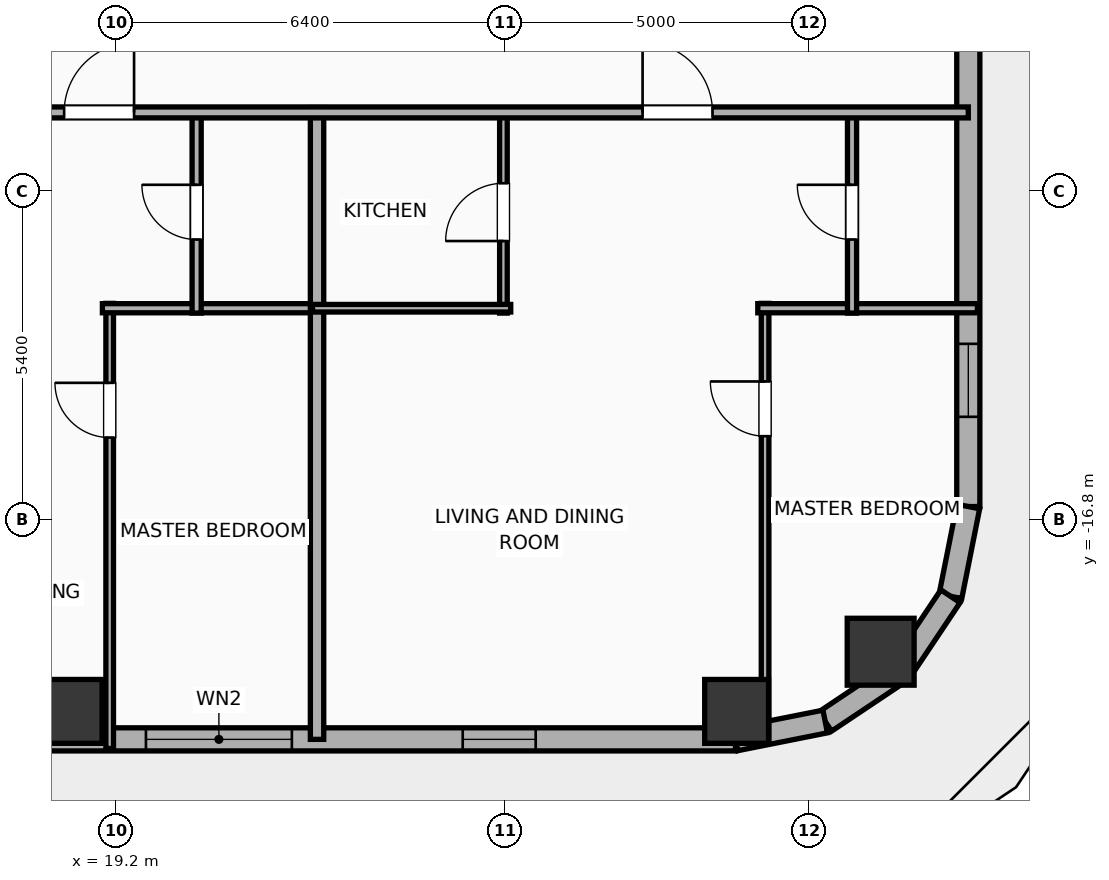
"""IFC4 building model, lengths in metres.
Left out: names, types, materials, properties, quantities, classifications, styles, units other than length and angle.
Written with IfcOpenShell. Run it as: python <this file> out.ifc"""

import sys

from ifc_helpers import new_model, si_unit, direction, frame, frame_2d, origin, origin_2d, place, context, subcontext, project, spatial, rectangle, hollow_rectangle, hollow_circle, extrude, element, fill, save


model = new_model("IFC4")
c1 = context("Model", 3, precision=1e-05, world=origin(), true_north=direction((0.0, 1.0)))
c2 = subcontext(c1, "Body", "Model", "MODEL_VIEW")
j1 = project(units=[si_unit("LENGTHUNIT", "METRE"), si_unit("PLANEANGLEUNIT", "RADIAN")], contexts=[c1])
p1 = place(None, origin())
s1 = spatial("IfcSite", under=j1, at=p1, CompositionType="ELEMENT")
p2 = place(p1, origin())
s2 = spatial("IfcBuilding", under=s1, at=p2, CompositionType="ELEMENT")
p3 = place(p2, frame((0.0, 0.0, 113.1)))
s3 = spatial("IfcBuildingStorey", under=s2, at=p3, CompositionType="ELEMENT", Elevation=113.1)
for number, where, z_axis, x_axis in (
    (1, (18.44, -19.95, 0.0), (0.0, 0.0, 1.0), (1.0, 0.0, 0.0)),
    (2, (29.4, -19.95, 0.0), (0.0, 0.0, 1.0), (1.0, 0.0, 0.0)),
):
    element("IfcColumn", number, at=place(p3, frame(where, z_axis=z_axis, x_axis=x_axis)), inside=s3, PredefinedType="COLUMN", context=c2, shape_type="SweptSolid", body=[
        extrude(hollow_rectangle(XDim=1.05, YDim=1.05, WallThickness=0.036, at=origin_2d()), origin(), (0.0, 0.0, 1.0), 3.9),
    ])
p4 = place(p3, frame((31.769, -18.969, 0.0), z_axis=(0.0, 0.0, 1.0), x_axis=(1.0, 0.0, 0.0)))
e3 = element("IfcColumn", 3, at=p4, inside=s3, PredefinedType="COLUMN", context=c2, shape_type="SweptSolid", body=[
    extrude(hollow_circle(Radius=0.55, WallThickness=0.036, at=origin_2d()), origin(), (0.0, 0.0, 1.0), 3.9),
])
p5 = place(p3, frame((29.381, -20.41, 0.0), z_axis=(0.0, 0.0, 1.0), x_axis=(-1.0, 0.0, 0.0)))
e4 = element("IfcWall", 4, at=p5, inside=s3, PredefinedType="ELEMENTEDWALL", context=c2, shape_type="SweptSolid", body=[
    extrude(rectangle(XDim=54.763, YDim=0.38, at=frame_2d((27.381, 0.0))), origin(), (0.0, 0.0, 1.0), 3.65),
])
p6 = place(p5, frame((15.679, 0.0, 0.0)))
e5 = element("IfcOpeningElement", 5, at=p6, cuts=e4, PredefinedType="OPENING", context=c2, shape_type="SweptSolid", body=[
    extrude(rectangle(XDim=1.5, YDim=2.05, at=frame_2d((0.75, 1.025))), frame((0.0, 0.2, 0.0), z_axis=(0.0, -1.0, 0.0), x_axis=(1.0, 0.0, 0.0)), (0.0, 0.0, 1.0), 0.4),
])
p7 = place(p5, frame((7.295, 0.0, 0.75)))
e6 = element("IfcOpeningElement", 6, at=p7, cuts=e4, PredefinedType="OPENING", context=c2, shape_type="SweptSolid", body=[
    extrude(rectangle(XDim=2.4, YDim=2.1, at=frame_2d((1.2, 1.05))), frame((0.0, 0.2, 0.0), z_axis=(0.0, -1.0, 0.0), x_axis=(1.0, 0.0, 0.0)), (0.0, 0.0, 1.0), 0.4),
])
p8 = place(p5, frame((18.486, 0.0, 0.75)))
e7 = element("IfcOpeningElement", 7, at=p8, cuts=e4, PredefinedType="OPENING", context=c2, shape_type="SweptSolid", body=[
    extrude(rectangle(XDim=2.4, YDim=2.1, at=frame_2d((1.2, 1.05))), frame((0.0, 0.2, 0.0), z_axis=(0.0, -1.0, 0.0), x_axis=(1.0, 0.0, 0.0)), (0.0, 0.0, 1.0), 0.4),
])
p9 = place(p5, frame((33.877, 0.0, 0.75)))
e8 = element("IfcOpeningElement", 8, at=p9, cuts=e4, PredefinedType="OPENING", context=c2, shape_type="SweptSolid", body=[
    extrude(rectangle(XDim=2.4, YDim=2.1, at=frame_2d((1.2, 1.05))), frame((0.0, 0.2, 0.0), z_axis=(0.0, -1.0, 0.0), x_axis=(1.0, 0.0, 0.0)), (0.0, 0.0, 1.0), 0.4),
])
p10 = place(p5, frame((48.367, 0.0, 0.75)))
e9 = element("IfcOpeningElement", 9, at=p10, cuts=e4, PredefinedType="OPENING", context=c2, shape_type="SweptSolid", body=[
    extrude(rectangle(XDim=2.4, YDim=2.1, at=frame_2d((1.2, 1.05))), frame((0.0, 0.2, 0.0), z_axis=(0.0, -1.0, 0.0), x_axis=(1.0, 0.0, 0.0)), (0.0, 0.0, 1.0), 0.4),
])
p11 = place(p5, frame((37.584, 0.0, 0.0)))
e10 = element("IfcOpeningElement", 10, at=p11, cuts=e4, PredefinedType="OPENING", context=c2, shape_type="SweptSolid", body=[
    extrude(rectangle(XDim=1.5, YDim=2.05, at=frame_2d((0.75, 1.025))), frame((0.0, 0.2, 0.0), z_axis=(0.0, -1.0, 0.0), x_axis=(1.0, 0.0, 0.0)), (0.0, 0.0, 1.0), 0.4),
])
p12 = place(p5, frame((52.277, 0.0, 0.75)))
e11 = element("IfcOpeningElement", 11, at=p12, cuts=e4, PredefinedType="OPENING", context=c2, shape_type="SweptSolid", body=[
    extrude(rectangle(XDim=1.2, YDim=2.05, at=frame_2d((0.6, 1.025))), frame((0.0, 0.2, 0.0), z_axis=(0.0, -1.0, 0.0), x_axis=(1.0, 0.0, 0.0)), (0.0, 0.0, 1.0), 0.4),
])
p13 = place(p5, frame((45.486, 0.0, 0.75)))
e12 = element("IfcOpeningElement", 12, at=p13, cuts=e4, PredefinedType="OPENING", context=c2, shape_type="SweptSolid", body=[
    extrude(rectangle(XDim=1.2, YDim=2.05, at=frame_2d((0.6, 1.025))), frame((0.0, 0.2, 0.0), z_axis=(0.0, -1.0, 0.0), x_axis=(1.0, 0.0, 0.0)), (0.0, 0.0, 1.0), 0.4),
])
p14 = place(p5, frame((41.736, 0.0, 0.75)))
e13 = element("IfcOpeningElement", 13, at=p14, cuts=e4, PredefinedType="OPENING", context=c2, shape_type="SweptSolid", body=[
    extrude(rectangle(XDim=1.2, YDim=2.05, at=frame_2d((0.6, 1.025))), frame((0.0, 0.2, 0.0), z_axis=(0.0, -1.0, 0.0), x_axis=(1.0, 0.0, 0.0)), (0.0, 0.0, 1.0), 0.4),
])
p15 = place(p5, frame((30.486, 0.0, 0.75)))
e14 = element("IfcOpeningElement", 14, at=p15, cuts=e4, PredefinedType="OPENING", context=c2, shape_type="SweptSolid", body=[
    extrude(rectangle(XDim=1.2, YDim=2.05, at=frame_2d((0.6, 1.025))), frame((0.0, 0.2, 0.0), z_axis=(0.0, -1.0, 0.0), x_axis=(1.0, 0.0, 0.0)), (0.0, 0.0, 1.0), 0.4),
])
p16 = place(p5, frame((26.736, 0.0, 0.75)))
e15 = element("IfcOpeningElement", 15, at=p16, cuts=e4, PredefinedType="OPENING", context=c2, shape_type="SweptSolid", body=[
    extrude(rectangle(XDim=1.2, YDim=2.05, at=frame_2d((0.6, 1.025))), frame((0.0, 0.2, 0.0), z_axis=(0.0, -1.0, 0.0), x_axis=(1.0, 0.0, 0.0)), (0.0, 0.0, 1.0), 0.4),
])
p17 = place(p5, frame((22.986, 0.0, 0.75)))
e16 = element("IfcOpeningElement", 16, at=p17, cuts=e4, PredefinedType="OPENING", context=c2, shape_type="SweptSolid", body=[
    extrude(rectangle(XDim=1.2, YDim=2.05, at=frame_2d((0.6, 1.025))), frame((0.0, 0.2, 0.0), z_axis=(0.0, -1.0, 0.0), x_axis=(1.0, 0.0, 0.0)), (0.0, 0.0, 1.0), 0.4),
])
p18 = place(p5, frame((11.736, 0.0, 0.75)))
e17 = element("IfcOpeningElement", 17, at=p18, cuts=e4, PredefinedType="OPENING", context=c2, shape_type="SweptSolid", body=[
    extrude(rectangle(XDim=1.2, YDim=2.05, at=frame_2d((0.6, 1.025))), frame((0.0, 0.2, 0.0), z_axis=(0.0, -1.0, 0.0), x_axis=(1.0, 0.0, 0.0)), (0.0, 0.0, 1.0), 0.4),
])
p19 = place(p5, frame((3.286, 0.0, 0.75)))
e18 = element("IfcOpeningElement", 18, at=p19, cuts=e4, PredefinedType="OPENING", context=c2, shape_type="SweptSolid", body=[
    extrude(rectangle(XDim=1.2, YDim=2.05, at=frame_2d((0.6, 1.025))), frame((0.0, 0.2, 0.0), z_axis=(0.0, -1.0, 0.0), x_axis=(1.0, 0.0, 0.0)), (0.0, 0.0, 1.0), 0.4),
])
p20 = place(p3, frame((33.21, 17.781, 0.0), z_axis=(0.0, 0.0, 1.0), x_axis=(0.0, -1.0, 0.0)))
e19 = element("IfcWall", 19, at=p20, inside=s3, PredefinedType="ELEMENTEDWALL", context=c2, shape_type="SweptSolid", body=[
    extrude(rectangle(XDim=34.363, YDim=0.38, at=frame_2d((17.181, 0.0))), origin(), (0.0, 0.0, 1.0), 3.65),
])
p21 = place(p20, frame((31.687, 0.0, 0.75)))
e20 = element("IfcOpeningElement", 20, at=p21, cuts=e19, PredefinedType="OPENING", context=c2, shape_type="SweptSolid", body=[
    extrude(rectangle(XDim=1.2, YDim=2.05, at=frame_2d((0.6, 1.025))), frame((0.0, 0.2, 0.0), z_axis=(0.0, -1.0, 0.0), x_axis=(1.0, 0.0, 0.0)), (0.0, 0.0, 1.0), 0.4),
])
p22 = place(p20, frame((12.836, 0.0, 0.75)))
e21 = element("IfcOpeningElement", 21, at=p22, cuts=e19, PredefinedType="OPENING", context=c2, shape_type="SweptSolid", body=[
    extrude(rectangle(XDim=1.2, YDim=2.05, at=frame_2d((0.6, 1.025))), frame((0.0, 0.2, 0.0), z_axis=(0.0, -1.0, 0.0), x_axis=(1.0, 0.0, 0.0)), (0.0, 0.0, 1.0), 0.4),
])
p23 = place(p20, frame((21.386, 0.0, 0.75)))
e22 = element("IfcOpeningElement", 22, at=p23, cuts=e19, PredefinedType="OPENING", context=c2, shape_type="SweptSolid", body=[
    extrude(rectangle(XDim=1.2, YDim=2.05, at=frame_2d((0.6, 1.025))), frame((0.0, 0.2, 0.0), z_axis=(0.0, -1.0, 0.0), x_axis=(1.0, 0.0, 0.0)), (0.0, 0.0, 1.0), 0.4),
])
p24 = place(p3, frame((33.21, -16.581, 0.0), z_axis=(0.0, 0.0, 1.0), x_axis=(-0.195086038585, -0.980786132421, 0.0)))
e23 = element("IfcWall", 23, at=p24, inside=s3, PredefinedType="ELEMENTEDWALL", context=c2, shape_type="SweptSolid", body=[
    extrude(rectangle(XDim=1.504, YDim=0.38, at=frame_2d((0.752, 0.0))), origin(), (0.0, 0.0, 1.0), 3.65),
])
p25 = place(p3, frame((32.917, -18.057, 0.0), z_axis=(0.0, 0.0, 1.0), x_axis=(-0.555610286119, -0.831442848281, 0.0)))
e24 = element("IfcWall", 24, at=p25, inside=s3, PredefinedType="ELEMENTEDWALL", context=c2, shape_type="SweptSolid", body=[
    extrude(rectangle(XDim=1.485, YDim=0.38, at=frame_2d((0.743, 0.0))), origin(), (0.0, 0.0, 1.0), 3.65),
])
p26 = place(p3, frame((32.091, -19.292, 0.0), z_axis=(0.0, 0.0, 1.0), x_axis=(-0.831468045563, -0.555572577804, 0.0)))
e25 = element("IfcWall", 25, at=p26, inside=s3, PredefinedType="ELEMENTEDWALL", context=c2, shape_type="SweptSolid", body=[
    extrude(rectangle(XDim=1.485, YDim=0.38, at=frame_2d((0.742, 0.0))), origin(), (0.0, 0.0, 1.0), 3.65),
])
p27 = place(p3, frame((30.857, -20.116, 0.0), z_axis=(0.0, 0.0, 1.0), x_axis=(-0.980786132421, -0.195086038585, 0.0)))
e26 = element("IfcWall", 26, at=p27, inside=s3, PredefinedType="ELEMENTEDWALL", context=c2, shape_type="SweptSolid", body=[
    extrude(rectangle(XDim=1.504, YDim=0.38, at=frame_2d((0.752, 0.0))), origin(), (0.0, 0.0, 1.0), 3.65),
])
p28 = place(p3, frame((19.09, -20.56, 0.0), z_axis=(0.0, 0.0, 1.0), x_axis=(0.0, 1.0, 0.0)))
e27 = element("IfcWall", 27, at=p28, inside=s3, PredefinedType="PARTITIONING", context=c2, shape_type="SweptSolid", body=[
    extrude(rectangle(XDim=7.32, YDim=0.125, at=frame_2d((3.66, 0.0))), origin(), (0.0, 0.0, 1.0), 3.65),
])
p29 = place(p28, frame((5.113, 0.0, 0.0)))
e28 = element("IfcOpeningElement", 28, at=p29, cuts=e27, PredefinedType="OPENING", context=c2, shape_type="SweptSolid", body=[
    extrude(rectangle(XDim=0.9, YDim=2.05, at=frame_2d((0.45, 1.025))), frame((0.0, 0.073, 0.0), z_axis=(0.0, -1.0, 0.0), x_axis=(1.0, 0.0, 0.0)), (0.0, 0.0, 1.0), 0.145),
])
p30 = place(p3, frame((18.97, -13.32, 0.0), z_axis=(0.0, 0.0, 1.0), x_axis=(1.0, 0.0, 0.0)))
e29 = element("IfcWall", 29, at=p30, inside=s3, PredefinedType="PLUMBINGWALL", context=c2, shape_type="SweptSolid", body=[
    extrude(rectangle(XDim=3.605, YDim=0.15, at=frame_2d((1.802, 0.0))), origin(), (0.0, 0.0, 1.0), 3.65),
])
p31 = place(p3, frame((20.52, -13.4, 0.0), z_axis=(0.0, 0.0, 1.0), x_axis=(0.0, 1.0, 0.0)))
e30 = element("IfcWall", 30, at=p31, inside=s3, PredefinedType="PLUMBINGWALL", context=c2, shape_type="SweptSolid", body=[
    extrude(rectangle(XDim=3.32, YDim=0.15, at=frame_2d((1.66, 0.0))), origin(), (0.0, 0.0, 1.0), 3.65),
])
p32 = place(p31, frame((1.21, 0.0, 0.0)))
e31 = element("IfcOpeningElement", 31, at=p32, cuts=e30, PredefinedType="OPENING", context=c2, shape_type="SweptSolid", body=[
    extrude(rectangle(XDim=0.9, YDim=2.05, at=frame_2d((0.45, 1.025))), frame((0.0, 0.085, 0.0), z_axis=(0.0, -1.0, 0.0), x_axis=(1.0, 0.0, 0.0)), (0.0, 0.0, 1.0), 0.17),
])
p33 = place(p3, frame((22.5, -20.41, 0.0), z_axis=(0.0, 0.0, 1.0), x_axis=(0.0, 1.0, 0.0)))
e32 = element("IfcWall", 32, at=p33, inside=s3, PredefinedType="PARTITIONING", context=c2, shape_type="SweptSolid", body=[
    extrude(rectangle(XDim=10.39, YDim=0.22, at=frame_2d((5.195, 0.0))), origin(), (0.0, 0.0, 1.0), 3.65),
])
p34 = place(p3, frame((29.868, -20.466, 0.0), z_axis=(0.0, 0.0, 1.0), x_axis=(0.0, 1.0, 0.0)))
e33 = element("IfcWall", 33, at=p34, inside=s3, PredefinedType="PARTITIONING", context=c2, shape_type="SweptSolid", body=[
    extrude(rectangle(XDim=7.226, YDim=0.125, at=frame_2d((3.613, 0.0))), origin(), (0.0, 0.0, 1.0), 3.65),
])
p35 = place(p34, frame((5.042, 0.0, 0.0)))
e34 = element("IfcOpeningElement", 34, at=p35, cuts=e33, PredefinedType="OPENING", context=c2, shape_type="SweptSolid", body=[
    extrude(rectangle(XDim=0.9, YDim=2.05, at=frame_2d((0.45, 1.025))), frame((0.0, 0.073, 0.0), z_axis=(0.0, -1.0, 0.0), x_axis=(1.0, 0.0, 0.0)), (0.0, 0.0, 1.0), 0.145),
])
p36 = place(p3, frame((29.748, -13.32, 0.0), z_axis=(0.0, 0.0, 1.0), x_axis=(1.0, 0.0, 0.0)))
e35 = element("IfcWall", 35, at=p36, inside=s3, PredefinedType="PLUMBINGWALL", context=c2, shape_type="SweptSolid", body=[
    extrude(rectangle(XDim=3.612, YDim=0.15, at=frame_2d((1.806, 0.0))), origin(), (0.0, 0.0, 1.0), 3.65),
])
p37 = place(p3, frame((25.565, -13.4, 0.0), z_axis=(0.0, 0.0, 1.0), x_axis=(0.0, 1.0, 0.0)))
e36 = element("IfcWall", 36, at=p37, inside=s3, PredefinedType="PARTITIONING", context=c2, shape_type="SweptSolid", body=[
    extrude(rectangle(XDim=3.32, YDim=0.125, at=frame_2d((1.66, 0.0))), origin(), (0.0, 0.0, 1.0), 3.65),
])
p38 = place(p37, frame((1.185, 0.0, 0.0)))
e37 = element("IfcOpeningElement", 37, at=p38, cuts=e36, PredefinedType="OPENING", context=c2, shape_type="SweptSolid", body=[
    extrude(rectangle(XDim=0.95, YDim=2.05, at=frame_2d((0.475, 1.025))), frame((0.0, 0.073, 0.0), z_axis=(0.0, -1.0, 0.0), x_axis=(1.0, 0.0, 0.0)), (0.0, 0.0, 1.0), 0.145),
])
p39 = place(p3, frame((22.425, -13.32, 0.0), z_axis=(0.0, 0.0, 1.0), x_axis=(1.0, 0.0, 0.0)))
e38 = element("IfcWall", 38, at=p39, inside=s3, PredefinedType="PARTITIONING", context=c2, shape_type="SweptSolid", body=[
    extrude(rectangle(XDim=3.26, YDim=0.125, at=frame_2d((1.63, 0.0))), origin(), (0.0, 0.0, 1.0), 3.65),
])
p40 = place(p3, frame((31.298, -13.4, 0.0), z_axis=(0.0, 0.0, 1.0), x_axis=(0.0, 1.0, 0.0)))
e39 = element("IfcWall", 39, at=p40, inside=s3, PredefinedType="PLUMBINGWALL", context=c2, shape_type="SweptSolid", body=[
    extrude(rectangle(XDim=3.32, YDim=0.15, at=frame_2d((1.66, 0.0))), origin(), (0.0, 0.0, 1.0), 3.65),
])
p41 = place(p40, frame((1.21, 0.0, 0.0)))
e40 = element("IfcOpeningElement", 40, at=p41, cuts=e39, PredefinedType="OPENING", context=c2, shape_type="SweptSolid", body=[
    extrude(rectangle(XDim=0.9, YDim=2.05, at=frame_2d((0.45, 1.025))), frame((0.0, 0.085, 0.0), z_axis=(0.0, -1.0, 0.0), x_axis=(1.0, 0.0, 0.0)), (0.0, 0.0, 1.0), 0.17),
])
p42 = place(p3, frame((-29.21, -10.1, 0.0), z_axis=(0.0, 0.0, 1.0), x_axis=(1.0, 0.0, 0.0)))
e41 = element("IfcWall", 41, at=p42, inside=s3, PredefinedType="PARTITIONING", context=c2, shape_type="SweptSolid", body=[
    extrude(rectangle(XDim=62.42, YDim=0.18, at=frame_2d((31.21, 0.0))), origin(), (0.0, 0.0, 1.0), 3.65),
])
p43 = place(p42, frame((3.002, 0.0, 0.0)))
e42 = element("IfcOpeningElement", 42, at=p43, cuts=e41, PredefinedType="OPENING", context=c2, shape_type="SweptSolid", body=[
    extrude(rectangle(XDim=0.9, YDim=2.05, at=frame_2d((0.45, 1.025))), frame((0.0, 0.1, 0.0), z_axis=(0.0, -1.0, 0.0), x_axis=(1.0, 0.0, 0.0)), (0.0, 0.0, 1.0), 0.2),
])
p44 = place(p42, frame((10.049, 0.0, 0.0)))
e43 = element("IfcOpeningElement", 43, at=p44, cuts=e41, PredefinedType="OPENING", context=c2, shape_type="SweptSolid", body=[
    extrude(rectangle(XDim=1.15, YDim=2.05, at=frame_2d((0.575, 1.025))), frame((0.0, 0.1, 0.0), z_axis=(0.0, -1.0, 0.0), x_axis=(1.0, 0.0, 0.0)), (0.0, 0.0, 1.0), 0.2),
])
p45 = place(p42, frame((17.552, 0.0, 0.0)))
e44 = element("IfcOpeningElement", 44, at=p45, cuts=e41, PredefinedType="OPENING", context=c2, shape_type="SweptSolid", body=[
    extrude(rectangle(XDim=1.15, YDim=2.05, at=frame_2d((0.575, 1.025))), frame((0.0, 0.1, 0.0), z_axis=(0.0, -1.0, 0.0), x_axis=(1.0, 0.0, 0.0)), (0.0, 0.0, 1.0), 0.2),
])
p46 = place(p42, frame((25.048, 0.0, 0.0)))
e45 = element("IfcOpeningElement", 45, at=p46, cuts=e41, PredefinedType="OPENING", context=c2, shape_type="SweptSolid", body=[
    extrude(rectangle(XDim=1.15, YDim=2.05, at=frame_2d((0.575, 1.025))), frame((0.0, 0.1, 0.0), z_axis=(0.0, -1.0, 0.0), x_axis=(1.0, 0.0, 0.0)), (0.0, 0.0, 1.0), 0.2),
])
p47 = place(p42, frame((32.551, 0.0, 0.0)))
e46 = element("IfcOpeningElement", 46, at=p47, cuts=e41, PredefinedType="OPENING", context=c2, shape_type="SweptSolid", body=[
    extrude(rectangle(XDim=1.15, YDim=2.05, at=frame_2d((0.575, 1.025))), frame((0.0, 0.1, 0.0), z_axis=(0.0, -1.0, 0.0), x_axis=(1.0, 0.0, 0.0)), (0.0, 0.0, 1.0), 0.2),
])
p48 = place(p42, frame((40.048, 0.0, 0.0)))
e47 = element("IfcOpeningElement", 47, at=p48, cuts=e41, PredefinedType="OPENING", context=c2, shape_type="SweptSolid", body=[
    extrude(rectangle(XDim=1.15, YDim=2.05, at=frame_2d((0.575, 1.025))), frame((0.0, 0.1, 0.0), z_axis=(0.0, -1.0, 0.0), x_axis=(1.0, 0.0, 0.0)), (0.0, 0.0, 1.0), 0.2),
])
p49 = place(p42, frame((47.551, 0.0, 0.0)))
e48 = element("IfcOpeningElement", 48, at=p49, cuts=e41, PredefinedType="OPENING", context=c2, shape_type="SweptSolid", body=[
    extrude(rectangle(XDim=1.15, YDim=2.05, at=frame_2d((0.575, 1.025))), frame((0.0, 0.1, 0.0), z_axis=(0.0, -1.0, 0.0), x_axis=(1.0, 0.0, 0.0)), (0.0, 0.0, 1.0), 0.2),
])
p50 = place(p42, frame((57.064, 0.0, 0.0)))
e49 = element("IfcOpeningElement", 49, at=p50, cuts=e41, PredefinedType="OPENING", context=c2, shape_type="SweptSolid", body=[
    extrude(rectangle(XDim=1.15, YDim=2.05, at=frame_2d((0.575, 1.025))), frame((0.0, 0.1, 0.0), z_axis=(0.0, -1.0, 0.0), x_axis=(1.0, 0.0, 0.0)), (0.0, 0.0, 1.0), 0.2),
])
p51 = place(p7, origin())
e50 = element("IfcWindow", 50, at=p51, inside=s3, PartitioningType="SINGLE_PANEL", PredefinedType="WINDOW", context=c2, shape_type="SweptSolid", body=[
    extrude(rectangle(XDim=2.4, YDim=2.1, at=frame_2d((1.2, 1.05))), frame((0.0, 0.03, 0.0), z_axis=(0.0, -1.0, 0.0), x_axis=(1.0, 0.0, 0.0)), (0.0, 0.0, 1.0), 0.06),
])
fill(e6, e50)
p52 = place(p19, origin())
e51 = element("IfcWindow", 51, at=p52, inside=s3, PartitioningType="SINGLE_PANEL", PredefinedType="WINDOW", context=c2, shape_type="SweptSolid", body=[
    extrude(rectangle(XDim=1.2, YDim=2.05, at=frame_2d((0.6, 1.025))), frame((0.0, 0.03, 0.0), z_axis=(0.0, -1.0, 0.0), x_axis=(1.0, 0.0, 0.0)), (0.0, 0.0, 1.0), 0.06),
])
fill(e18, e51)
p53 = place(p21, origin())
e52 = element("IfcWindow", 52, at=p53, inside=s3, PartitioningType="SINGLE_PANEL", PredefinedType="WINDOW", context=c2, shape_type="SweptSolid", body=[
    extrude(rectangle(XDim=1.2, YDim=2.05, at=frame_2d((0.6, 1.025))), frame((0.0, 0.03, 0.0), z_axis=(0.0, -1.0, 0.0), x_axis=(1.0, 0.0, 0.0)), (0.0, 0.0, 1.0), 0.06),
])
fill(e20, e52)
p54 = place(p29, origin())
e53 = element("IfcDoor", 53, at=p54, inside=s3, OperationType="SINGLE_SWING_RIGHT", PredefinedType="DOOR", context=c2, shape_type="SweptSolid", body=[
    extrude(rectangle(XDim=0.9, YDim=2.05, at=frame_2d((0.45, 1.025))), frame((0.0, 0.025, 0.0), z_axis=(0.0, -1.0, 0.0), x_axis=(1.0, 0.0, 0.0)), (0.0, 0.0, 1.0), 0.05),
])
fill(e28, e53)
p55 = place(p32, origin())
e54 = element("IfcDoor", 54, at=p55, inside=s3, OperationType="SINGLE_SWING_RIGHT", PredefinedType="DOOR", context=c2, shape_type="SweptSolid", body=[
    extrude(rectangle(XDim=0.9, YDim=2.05, at=frame_2d((0.45, 1.025))), frame((0.0, 0.025, 0.0), z_axis=(0.0, -1.0, 0.0), x_axis=(1.0, 0.0, 0.0)), (0.0, 0.0, 1.0), 0.05),
])
fill(e31, e54)
p56 = place(p35, origin())
e55 = element("IfcDoor", 55, at=p56, inside=s3, OperationType="SINGLE_SWING_RIGHT", PredefinedType="DOOR", context=c2, shape_type="SweptSolid", body=[
    extrude(rectangle(XDim=0.9, YDim=2.05, at=frame_2d((0.45, 1.025))), frame((0.0, 0.025, 0.0), z_axis=(0.0, -1.0, 0.0), x_axis=(1.0, 0.0, 0.0)), (0.0, 0.0, 1.0), 0.05),
])
fill(e34, e55)
p57 = place(p38, origin())
e56 = element("IfcDoor", 56, at=p57, inside=s3, OperationType="SINGLE_SWING_LEFT", PredefinedType="DOOR", context=c2, shape_type="SweptSolid", body=[
    extrude(rectangle(XDim=0.95, YDim=2.05, at=frame_2d((0.475, 1.025))), frame((0.0, 0.025, 0.0), z_axis=(0.0, -1.0, 0.0), x_axis=(1.0, 0.0, 0.0)), (0.0, 0.0, 1.0), 0.05),
])
fill(e37, e56)
p58 = place(p41, origin())
e57 = element("IfcDoor", 57, at=p58, inside=s3, OperationType="SINGLE_SWING_RIGHT", PredefinedType="DOOR", context=c2, shape_type="SweptSolid", body=[
    extrude(rectangle(XDim=0.9, YDim=2.05, at=frame_2d((0.45, 1.025))), frame((0.0, 0.025, 0.0), z_axis=(0.0, -1.0, 0.0), x_axis=(1.0, 0.0, 0.0)), (0.0, 0.0, 1.0), 0.05),
])
fill(e40, e57)
p59 = place(p49, origin())
e58 = element("IfcDoor", 58, at=p59, inside=s3, OperationType="SINGLE_SWING_RIGHT", PredefinedType="DOOR", context=c2, shape_type="SweptSolid", body=[
    extrude(rectangle(XDim=1.15, YDim=2.05, at=frame_2d((0.575, 1.025))), frame((0.0, 0.025, 0.0), z_axis=(0.0, -1.0, 0.0), x_axis=(1.0, 0.0, 0.0)), (0.0, 0.0, 1.0), 0.05),
])
fill(e48, e58)
p60 = place(p50, origin())
e59 = element("IfcDoor", 59, at=p60, inside=s3, OperationType="SINGLE_SWING_LEFT", PredefinedType="DOOR", context=c2, shape_type="SweptSolid", body=[
    extrude(rectangle(XDim=1.15, YDim=2.05, at=frame_2d((0.575, 1.025))), frame((0.0, 0.025, 0.0), z_axis=(0.0, -1.0, 0.0), x_axis=(1.0, 0.0, 0.0)), (0.0, 0.0, 1.0), 0.05),
])
fill(e49, e59)
save(model, sys.argv[1])
